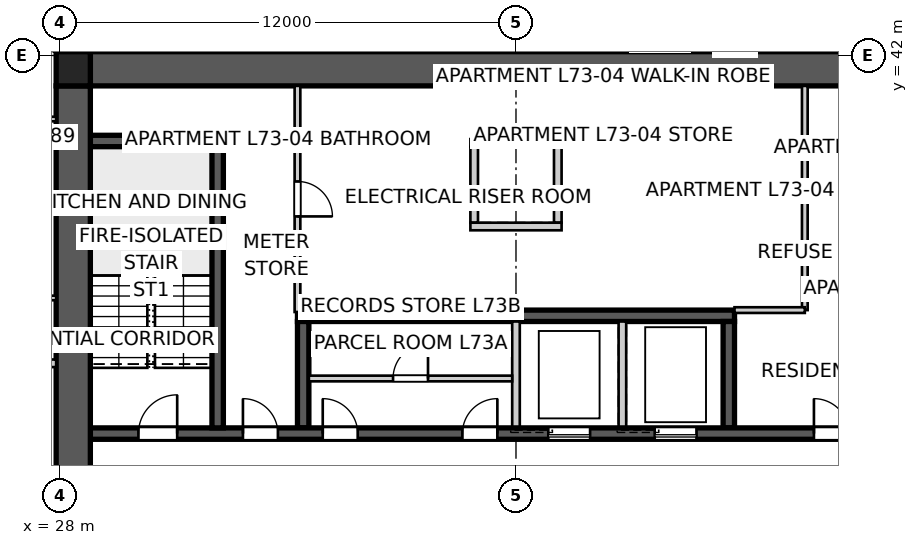
"""IFC4 building model, lengths in metres.
Left out: names, types, materials, properties, quantities, classifications, styles, units other than length and angle.
Written with IfcOpenShell. Run it as: python <this file> out.ifc"""

import sys

from ifc_helpers import new_model, si_unit, direction, frame, frame_2d, origin, origin_2d, place, context, subcontext, project, spatial, polyline, rectangle, outline, extrude, element, fill, save


model = new_model("IFC4")
c1 = context("Model", 3, precision=1e-05, world=origin(), true_north=direction((0.0, 1.0)))
c2 = subcontext(c1, "Body", "Model", "MODEL_VIEW")
j1 = project(units=[si_unit("LENGTHUNIT", "METRE"), si_unit("PLANEANGLEUNIT", "RADIAN")], contexts=[c1])
p1 = place(None, origin())
s1 = spatial("IfcSite", under=j1, at=p1, CompositionType="ELEMENT")
p2 = place(p1, origin())
s2 = spatial("IfcBuilding", under=s1, at=p2, CompositionType="ELEMENT")
p3 = place(p2, frame((0.0, 0.0, 264.2)))
s3 = spatial("IfcBuildingStorey", under=s2, at=p3, CompositionType="ELEMENT", Elevation=264.2)
p4 = place(p3, frame((28.8, 41.65, 0.0), z_axis=(0.0, 0.0, 1.0), x_axis=(1.0, 0.0, 0.0)))
e1 = element("IfcWall", 1, at=p4, inside=s3, PredefinedType="SHEAR", context=c2, shape_type="SweptSolid", body=[
    extrude(outline(polyline([(0.0, -0.45), (22.4, -0.45), (22.4, -0.025), (22.85, -0.025), (22.85, 0.025), (22.4, 0.025), (22.4, 0.45), (0.0, 0.45), (0.0, 0.025), (-0.45, 0.025), (-0.45, -0.025), (0.0, -0.025), (0.0, -0.45)])), origin(), (0.0, 0.0, 1.0), 3.4),
])
p5 = place(p3, frame((28.35, 41.2, 0.0), z_axis=(0.0, 0.0, 1.0), x_axis=(0.0, -1.0, 0.0)))
e2 = element("IfcWall", 2, at=p5, inside=s3, PredefinedType="SHEAR", context=c2, shape_type="SweptSolid", body=[
    extrude(outline(polyline([(0.0, -0.45), (22.4, -0.45), (22.4, -0.025), (22.85, -0.025), (22.85, 0.025), (22.4, 0.025), (22.4, 0.45), (0.0, 0.45), (0.0, 0.025), (-0.45, 0.025), (-0.45, -0.025), (0.0, -0.025), (0.0, -0.45)])), origin(), (0.0, 0.0, 1.0), 3.4),
])
p6 = place(p5, frame((11.14, 0.0, 0.0)))
e3 = element("IfcOpeningElement", 3, at=p6, cuts=e2, PredefinedType="OPENING", context=c2, shape_type="SweptSolid", body=[
    extrude(rectangle(XDim=1.02, YDim=2.4, at=frame_2d((0.51, 1.2))), frame((0.0, 0.46, 0.0), z_axis=(0.0, -1.0, 0.0), x_axis=(1.0, 0.0, 0.0)), (0.0, 0.0, 1.0), 0.92),
])
p7 = place(p3, frame((28.8, 32.05, 0.0), z_axis=(0.0, 0.0, 1.0), x_axis=(1.0, 0.0, 0.0)))
e4 = element("IfcWall", 4, at=p7, inside=s3, PredefinedType="SHEAR", context=c2, shape_type="SweptSolid", body=[
    extrude(rectangle(XDim=22.4, YDim=0.3, at=frame_2d((11.2, 0.0))), origin(), (0.0, 0.0, 1.0), 3.4),
])
p8 = place(p7, frame((19.04, 0.0, 0.0)))
e5 = element("IfcOpeningElement", 5, at=p8, cuts=e4, PredefinedType="OPENING", context=c2, shape_type="SweptSolid", body=[
    extrude(rectangle(XDim=0.92, YDim=2.1, at=frame_2d((0.46, 1.05))), frame((0.0, 0.16, 0.0), z_axis=(0.0, -1.0, 0.0), x_axis=(1.0, 0.0, 0.0)), (0.0, 0.0, 1.0), 0.32),
])
p9 = place(p7, frame((1.265, 0.0, 0.0)))
e6 = element("IfcOpeningElement", 6, at=p9, cuts=e4, PredefinedType="OPENING", context=c2, shape_type="SweptSolid", body=[
    extrude(rectangle(XDim=1.02, YDim=2.1, at=frame_2d((0.51, 1.05))), frame((0.0, 0.16, 0.0), z_axis=(0.0, -1.0, 0.0), x_axis=(1.0, 0.0, 0.0)), (0.0, 0.0, 1.0), 0.32),
])
p10 = place(p7, frame((4.015, 0.0, 0.0)))
e7 = element("IfcOpeningElement", 7, at=p10, cuts=e4, PredefinedType="OPENING", context=c2, shape_type="SweptSolid", body=[
    extrude(rectangle(XDim=0.92, YDim=2.1, at=frame_2d((0.46, 1.05))), frame((0.0, 0.16, 0.0), z_axis=(0.0, -1.0, 0.0), x_axis=(1.0, 0.0, 0.0)), (0.0, 0.0, 1.0), 0.32),
])
p11 = place(p7, frame((6.115, 0.0, 0.0)))
e8 = element("IfcOpeningElement", 8, at=p11, cuts=e4, PredefinedType="OPENING", context=c2, shape_type="SweptSolid", body=[
    extrude(rectangle(XDim=0.92, YDim=2.1, at=frame_2d((0.46, 1.05))), frame((0.0, 0.16, 0.0), z_axis=(0.0, -1.0, 0.0), x_axis=(1.0, 0.0, 0.0)), (0.0, 0.0, 1.0), 0.32),
])
p12 = place(p7, frame((9.79, 0.0, 0.0)))
e9 = element("IfcOpeningElement", 9, at=p12, cuts=e4, PredefinedType="OPENING", context=c2, shape_type="SweptSolid", body=[
    extrude(rectangle(XDim=0.92, YDim=2.1, at=frame_2d((0.46, 1.05))), frame((0.0, 0.16, 0.0), z_axis=(0.0, -1.0, 0.0), x_axis=(1.0, 0.0, 0.0)), (0.0, 0.0, 1.0), 0.32),
])
p13 = place(p7, frame((12.05, 0.0, 0.0)))
e10 = element("IfcOpeningElement", 10, at=p13, cuts=e4, PredefinedType="OPENING", context=c2, shape_type="SweptSolid", body=[
    extrude(rectangle(XDim=1.1, YDim=2.1, at=frame_2d((0.55, 1.05))), frame((0.0, 0.16, 0.0), z_axis=(0.0, -1.0, 0.0), x_axis=(1.0, 0.0, 0.0)), (0.0, 0.0, 1.0), 0.32),
])
p14 = place(p7, frame((14.85, 0.0, 0.0)))
e11 = element("IfcOpeningElement", 11, at=p14, cuts=e4, PredefinedType="OPENING", context=c2, shape_type="SweptSolid", body=[
    extrude(rectangle(XDim=1.1, YDim=2.1, at=frame_2d((0.55, 1.05))), frame((0.0, 0.16, 0.0), z_axis=(0.0, -1.0, 0.0), x_axis=(1.0, 0.0, 0.0)), (0.0, 0.0, 1.0), 0.32),
])
p15 = place(p3, frame((34.25, 35.15, 0.0), z_axis=(0.0, 0.0, 1.0), x_axis=(1.0, 0.0, 0.0)))
e12 = element("IfcWall", 12, at=p15, inside=s3, PredefinedType="SHEAR", context=c2, shape_type="SweptSolid", body=[
    extrude(rectangle(XDim=11.5, YDim=0.3, at=frame_2d((5.75, 0.0))), origin(), (0.0, 0.0, 1.0), 3.4),
])
p16 = place(p3, frame((34.4, 32.2, 0.0), z_axis=(0.0, 0.0, 1.0), x_axis=(0.0, 1.0, 0.0)))
e13 = element("IfcWall", 13, at=p16, inside=s3, PredefinedType="SHEAR", context=c2, shape_type="SweptSolid", body=[
    extrude(rectangle(XDim=2.8, YDim=0.3, at=frame_2d((1.4, 0.0))), origin(), (0.0, 0.0, 1.0), 3.4),
])
for number, where, z_axis, x_axis in (
    (14, (40.0, 32.2, 0.0), (0.0, 0.0, 1.0), (0.0, 1.0, 0.0)),
    (15, (42.8, 32.2, 0.0), (0.0, 0.0, 1.0), (0.0, 1.0, 0.0)),
):
    element("IfcWall", number, at=place(p3, frame(where, z_axis=z_axis, x_axis=x_axis)), inside=s3, PredefinedType="SOLIDWALL", context=c2, shape_type="SweptSolid", body=[
        extrude(rectangle(XDim=2.8, YDim=0.2, at=frame_2d((1.4, 0.0))), origin(), (0.0, 0.0, 1.0), 3.4),
    ])
p17 = place(p3, frame((45.6, 32.2, 0.0), z_axis=(0.0, 0.0, 1.0), x_axis=(0.0, 1.0, 0.0)))
e16 = element("IfcWall", 16, at=p17, inside=s3, PredefinedType="SHEAR", context=c2, shape_type="SweptSolid", body=[
    extrude(rectangle(XDim=2.8, YDim=0.3, at=frame_2d((1.4, 0.0))), origin(), (0.0, 0.0, 1.0), 3.4),
])
p18 = place(p3, frame((32.15, 32.2, 0.0), z_axis=(0.0, 0.0, 1.0), x_axis=(0.0, 1.0, 0.0)))
e17 = element("IfcWall", 17, at=p18, inside=s3, PredefinedType="SHEAR", context=c2, shape_type="SweptSolid", body=[
    extrude(rectangle(XDim=7.7, YDim=0.3, at=frame_2d((3.85, 0.0))), origin(), (0.0, 0.0, 1.0), 3.4),
])
p19 = place(p3, frame((28.8, 39.75, 0.0), z_axis=(0.0, 0.0, 1.0), x_axis=(1.0, 0.0, 0.0)))
e18 = element("IfcWall", 18, at=p19, inside=s3, PredefinedType="SHEAR", context=c2, shape_type="SweptSolid", body=[
    extrude(rectangle(XDim=3.5, YDim=0.3, at=frame_2d((1.75, 0.0))), origin(), (0.0, 0.0, 1.0), 3.4),
])
for number, where, z_axis, x_axis in (
    (19, (38.9, 37.6, 0.0), (0.0, 0.0, 1.0), (0.0, 1.0, 0.0)),
    (20, (41.1, 37.6, 0.0), (0.0, 0.0, 1.0), (0.0, 1.0, 0.0)),
):
    element("IfcWall", number, at=place(p3, frame(where, z_axis=z_axis, x_axis=x_axis)), inside=s3, PredefinedType="SOLIDWALL", context=c2, shape_type="SweptSolid", body=[
        extrude(rectangle(XDim=2.0, YDim=0.2, at=frame_2d((1.0, 0.0))), origin(), (0.0, 0.0, 1.0), 3.4),
    ])
for number, where, z_axis, x_axis in (
    (21, (38.8, 37.5, 0.0), (0.0, 0.0, 1.0), (1.0, 0.0, 0.0)),
    (22, (38.8, 39.7, 0.0), (0.0, 0.0, 1.0), (1.0, 0.0, 0.0)),
):
    element("IfcWall", number, at=place(p3, frame(where, z_axis=z_axis, x_axis=x_axis)), inside=s3, PredefinedType="SOLIDWALL", context=c2, shape_type="SweptSolid", body=[
        extrude(rectangle(XDim=2.4, YDim=0.2, at=frame_2d((1.2, 0.0))), origin(), (0.0, 0.0, 1.0), 3.4),
    ])
p20 = place(p3, frame((28.35, 41.65, 0.0), z_axis=(0.0, 0.0, 1.0), x_axis=(1.0, 0.0, 0.0)))
e23 = element("IfcColumn", 23, at=p20, inside=s3, PredefinedType="COLUMN", context=c2, shape_type="SweptSolid", body=[
    extrude(rectangle(XDim=0.9, YDim=0.9, at=origin_2d()), origin(), (0.0, 0.0, 1.0), 3.4),
])
p21 = place(p3, frame((27.9, 33.9, 0.0), z_axis=(0.0, 0.0, 1.0), x_axis=(-1.0, 0.0, 0.0)))
e24 = element("IfcWall", 24, at=p21, inside=s3, PredefinedType="PARTITIONING", context=c2, shape_type="SweptSolid", body=[
    extrude(rectangle(XDim=3.3, YDim=0.2, at=frame_2d((1.65, 0.0))), origin(), (0.0, 0.0, 1.0), 3.2),
])
p22 = place(p3, frame((34.25, 41.2, 0.0), z_axis=(0.0, 0.0, 1.0), x_axis=(0.0, -1.0, 0.0)))
e25 = element("IfcWall", 25, at=p22, inside=s3, PredefinedType="SOLIDWALL", context=c2, shape_type="SweptSolid", body=[
    extrude(rectangle(XDim=5.95, YDim=0.15, at=frame_2d((2.975, 0.0))), origin(), (0.0, 0.0, 1.0), 3.2),
])
p23 = place(p22, frame((2.515, 0.0, 0.0)))
e26 = element("IfcOpeningElement", 26, at=p23, cuts=e25, PredefinedType="OPENING", context=c2, shape_type="SweptSolid", body=[
    extrude(rectangle(XDim=0.92, YDim=2.1, at=frame_2d((0.46, 1.05))), frame((0.0, 0.085, 0.0), z_axis=(0.0, -1.0, 0.0), x_axis=(1.0, 0.0, 0.0)), (0.0, 0.0, 1.0), 0.17),
])
p24 = place(p3, frame((47.6, 41.2, 0.0), z_axis=(0.0, 0.0, 1.0), x_axis=(0.0, -1.0, 0.0)))
e27 = element("IfcWall", 27, at=p24, inside=s3, PredefinedType="SOLIDWALL", context=c2, shape_type="SweptSolid", body=[
    extrude(rectangle(XDim=5.9, YDim=0.15, at=frame_2d((2.95, 0.0))), origin(), (0.0, 0.0, 1.0), 3.2),
])
p25 = place(p3, frame((47.6, 35.3, 0.0), z_axis=(0.0, 0.0, 1.0), x_axis=(-1.0, 0.0, 0.0)))
e28 = element("IfcWall", 28, at=p25, inside=s3, PredefinedType="SOLIDWALL", context=c2, shape_type="SweptSolid", body=[
    extrude(rectangle(XDim=1.85, YDim=0.15, at=frame_2d((0.925, 0.0))), origin(), (0.0, 0.0, 1.0), 3.2),
])
p26 = place(p3, frame((21.8, 35.619, 0.0), z_axis=(0.0, 0.0, 1.0), x_axis=(1.0, 0.0, 0.0)))
e29 = element("IfcWall", 29, at=p26, inside=s3, PredefinedType="PARTITIONING", context=c2, shape_type="SweptSolid", body=[
    extrude(rectangle(XDim=6.1, YDim=0.12, at=frame_2d((3.05, 0.0))), origin(), (0.0, 0.0, 1.0), 3.2),
])
p27 = place(p26, frame((2.59, 0.0, 0.0)))
e30 = element("IfcOpeningElement", 30, at=p27, cuts=e29, PredefinedType="OPENING", context=c2, shape_type="SweptSolid", body=[
    extrude(rectangle(XDim=0.92, YDim=2.34, at=frame_2d((0.46, 1.17))), frame((0.0, 0.07, 0.0), z_axis=(0.0, -1.0, 0.0), x_axis=(1.0, 0.0, 0.0)), (0.0, 0.0, 1.0), 0.14),
])
p28 = place(p3, frame((23.902, 40.328, 0.0), z_axis=(0.0, 0.0, 1.0), x_axis=(1.0, 0.0, 0.0)))
e31 = element("IfcWall", 31, at=p28, inside=s3, PredefinedType="PARTITIONING", context=c2, shape_type="SweptSolid", body=[
    extrude(rectangle(XDim=3.998, YDim=0.12, at=frame_2d((1.999, 0.0))), origin(), (0.0, 0.0, 1.0), 3.2),
])
p29 = place(p28, frame((1.519, 0.0, 0.0)))
e32 = element("IfcOpeningElement", 32, at=p29, cuts=e31, PredefinedType="OPENING", context=c2, shape_type="SweptSolid", body=[
    extrude(rectangle(XDim=0.96, YDim=2.1, at=frame_2d((0.48, 1.05))), frame((0.0, 0.07, 0.0), z_axis=(0.0, -1.0, 0.0), x_axis=(1.0, 0.0, 0.0)), (0.0, 0.0, 1.0), 0.14),
])
p30 = place(p3, frame((34.55, 33.5, 0.0), z_axis=(0.0, 0.0, 1.0), x_axis=(1.0, 0.0, 0.0)))
e33 = element("IfcWall", 33, at=p30, inside=s3, PredefinedType="SOLIDWALL", context=c2, shape_type="SweptSolid", body=[
    extrude(rectangle(XDim=5.35, YDim=0.15, at=frame_2d((2.675, 0.0))), origin(), (0.0, 0.0, 1.0), 3.2),
])
p31 = place(p30, frame((2.215, 0.0, 0.0)))
e34 = element("IfcOpeningElement", 34, at=p31, cuts=e33, PredefinedType="OPENING", context=c2, shape_type="SweptSolid", body=[
    extrude(rectangle(XDim=0.92, YDim=2.1, at=frame_2d((0.46, 1.05))), frame((0.0, 0.085, 0.0), z_axis=(0.0, -1.0, 0.0), x_axis=(1.0, 0.0, 0.0)), (0.0, 0.0, 1.0), 0.17),
])
p32 = place(p8, origin())
e35 = element("IfcDoor", 35, at=p32, inside=s3, OperationType="SINGLE_SWING_LEFT", PredefinedType="DOOR", context=c2, shape_type="SweptSolid", body=[
    extrude(rectangle(XDim=0.92, YDim=2.1, at=frame_2d((0.46, 1.05))), frame((0.0, 0.025, 0.0), z_axis=(0.0, -1.0, 0.0), x_axis=(1.0, 0.0, 0.0)), (0.0, 0.0, 1.0), 0.05),
])
fill(e5, e35)
p33 = place(p9, origin())
e36 = element("IfcDoor", 36, at=p33, inside=s3, OperationType="SINGLE_SWING_RIGHT", PredefinedType="DOOR", context=c2, shape_type="SweptSolid", body=[
    extrude(rectangle(XDim=1.02, YDim=2.1, at=frame_2d((0.51, 1.05))), frame((0.0, 0.025, 0.0), z_axis=(0.0, -1.0, 0.0), x_axis=(1.0, 0.0, 0.0)), (0.0, 0.0, 1.0), 0.05),
])
fill(e6, e36)
p34 = place(p10, origin())
e37 = element("IfcDoor", 37, at=p34, inside=s3, OperationType="SINGLE_SWING_LEFT", PredefinedType="DOOR", context=c2, shape_type="SweptSolid", body=[
    extrude(rectangle(XDim=0.92, YDim=2.1, at=frame_2d((0.46, 1.05))), frame((0.0, 0.025, 0.0), z_axis=(0.0, -1.0, 0.0), x_axis=(1.0, 0.0, 0.0)), (0.0, 0.0, 1.0), 0.05),
])
fill(e7, e37)
p35 = place(p23, origin())
e38 = element("IfcDoor", 38, at=p35, inside=s3, OperationType="SINGLE_SWING_RIGHT", PredefinedType="DOOR", context=c2, shape_type="SweptSolid", body=[
    extrude(rectangle(XDim=0.92, YDim=2.1, at=frame_2d((0.46, 1.05))), frame((0.0, 0.025, 0.0), z_axis=(0.0, -1.0, 0.0), x_axis=(1.0, 0.0, 0.0)), (0.0, 0.0, 1.0), 0.05),
])
fill(e26, e38)
p36 = place(p11, origin())
e39 = element("IfcDoor", 39, at=p36, inside=s3, OperationType="SINGLE_SWING_LEFT", PredefinedType="DOOR", context=c2, shape_type="SweptSolid", body=[
    extrude(rectangle(XDim=0.92, YDim=2.1, at=frame_2d((0.46, 1.05))), frame((0.0, 0.025, 0.0), z_axis=(0.0, -1.0, 0.0), x_axis=(1.0, 0.0, 0.0)), (0.0, 0.0, 1.0), 0.05),
])
fill(e8, e39)
p37 = place(p12, origin())
e40 = element("IfcDoor", 40, at=p37, inside=s3, OperationType="SINGLE_SWING_RIGHT", PredefinedType="DOOR", context=c2, shape_type="SweptSolid", body=[
    extrude(rectangle(XDim=0.92, YDim=2.1, at=frame_2d((0.46, 1.05))), frame((0.0, 0.025, 0.0), z_axis=(0.0, -1.0, 0.0), x_axis=(1.0, 0.0, 0.0)), (0.0, 0.0, 1.0), 0.05),
])
fill(e9, e40)
p38 = place(p31, origin())
e41 = element("IfcDoor", 41, at=p38, inside=s3, OperationType="SINGLE_SWING_RIGHT", PredefinedType="DOOR", context=c2, shape_type="SweptSolid", body=[
    extrude(rectangle(XDim=0.92, YDim=2.1, at=frame_2d((0.46, 1.05))), frame((0.0, 0.025, 0.0), z_axis=(0.0, -1.0, 0.0), x_axis=(1.0, 0.0, 0.0)), (0.0, 0.0, 1.0), 0.05),
])
fill(e34, e41)
p39 = place(p13, origin())
e42 = element("IfcDoor", 42, at=p39, inside=s3, OperationType="SLIDING_TO_LEFT", PredefinedType="DOOR", context=c2, shape_type="SweptSolid", body=[
    extrude(rectangle(XDim=1.1, YDim=2.1, at=frame_2d((0.55, 1.05))), frame((0.0, 0.025, 0.0), z_axis=(0.0, -1.0, 0.0), x_axis=(1.0, 0.0, 0.0)), (0.0, 0.0, 1.0), 0.05),
])
fill(e10, e42)
p40 = place(p14, origin())
e43 = element("IfcDoor", 43, at=p40, inside=s3, OperationType="SLIDING_TO_LEFT", PredefinedType="DOOR", context=c2, shape_type="SweptSolid", body=[
    extrude(rectangle(XDim=1.1, YDim=2.1, at=frame_2d((0.55, 1.05))), frame((0.0, 0.025, 0.0), z_axis=(0.0, -1.0, 0.0), x_axis=(1.0, 0.0, 0.0)), (0.0, 0.0, 1.0), 0.05),
])
fill(e11, e43)
save(model, sys.argv[1])
